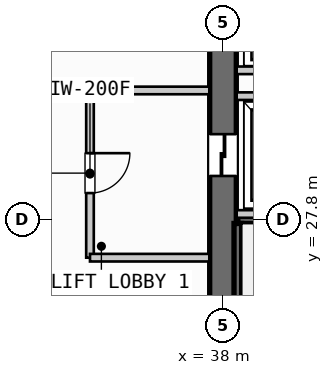
"""IFC4 building model, lengths in metres.
Left out: names, types, materials, properties, quantities, classifications, styles, units other than length and angle.
Written with IfcOpenShell. Run it as: python <this file> out.ifc"""

import sys

from ifc_helpers import new_model, si_unit, direction, frame, frame_2d, origin, place, context, subcontext, project, spatial, rectangle, extrude, source, transform, mapped, element, fill, save


model = new_model("IFC4")
c1 = context("Model", 3, precision=1e-05, world=origin(), true_north=direction((0.0, 1.0)))
c2 = subcontext(c1, "Body", "Model", "MODEL_VIEW")
j1 = project(units=[si_unit("LENGTHUNIT", "METRE"), si_unit("PLANEANGLEUNIT", "RADIAN")], contexts=[c1])
p1 = place(None, origin())
s1 = spatial("IfcSite", under=j1, at=p1, CompositionType="ELEMENT")
p2 = place(p1, origin())
s2 = spatial("IfcBuilding", under=s1, at=p2, CompositionType="ELEMENT")
p3 = place(p2, frame((0.0, 0.0, 10.0)))
s3 = spatial("IfcBuildingStorey", under=s2, at=p3, CompositionType="ELEMENT", Elevation=10.0)
p4 = place(p3, frame((38.0, 35.26, 0.0), z_axis=(0.0, 0.0, 1.0), x_axis=(0.0, -1.0, 0.0)))
e1 = element("IfcWall", 1, at=p4, inside=s3, PredefinedType="SHEAR", context=c2, shape_type="SweptSolid", body=[
    extrude(rectangle(XDim=14.92, YDim=0.7, at=frame_2d((7.46, 0.0))), origin(), (0.0, 0.0, 1.0), 4.53),
])
p5 = place(p4, frame((5.21, 0.0, 0.0)))
e2 = element("IfcOpeningElement", 2, at=p5, cuts=e1, PredefinedType="OPENING", context=c2, shape_type="SweptSolid", body=[
    extrude(rectangle(XDim=1.1, YDim=2.2, at=frame_2d((0.55, 1.1))), frame((0.0, 0.36, 0.0), z_axis=(0.0, -1.0, 0.0), x_axis=(1.0, 0.0, 0.0)), (0.0, 0.0, 1.0), 0.72),
])
p6 = place(p3, frame((38.39, 27.8, 0.0), z_axis=(0.0, 0.0, 1.0), x_axis=(1.0, 0.0, 0.0)))
e3 = element("IfcWall", 3, at=p6, inside=s3, PredefinedType="SHEAR", context=c2, shape_type="SweptSolid", body=[
    extrude(rectangle(XDim=3.06, YDim=0.2, at=frame_2d((1.53, 0.0))), origin(), (0.0, 0.0, 1.0), 4.53),
])
p7 = place(p3, frame((38.39, 20.35, 0.0), z_axis=(0.0, 0.0, 1.0), x_axis=(0.0, 1.0, 0.0)))
e4 = element("IfcWall", 4, at=p7, inside=s3, PredefinedType="SHEAR", context=c2, shape_type="SweptSolid", body=[
    extrude(rectangle(XDim=7.35, YDim=0.2, at=frame_2d((3.675, 0.0))), origin(), (0.0, 0.0, 1.0), 4.53),
])
for number, where, z_axis, x_axis in (
    (5, (38.36, 27.95, 0.0), (0.0, 0.0, 1.0), (1.0, 0.0, 0.0)),
    (6, (38.36, 31.05, 0.0), (0.0, 0.0, 1.0), (1.0, 0.0, 0.0)),
):
    element("IfcWall", number, at=place(p3, frame(where, z_axis=z_axis, x_axis=x_axis)), inside=s3, PredefinedType="PARTITIONING", context=c2, shape_type="SweptSolid", body=[
        extrude(rectangle(XDim=2.79, YDim=0.2, at=frame_2d((1.395, 0.0))), origin(), (0.0, 0.0, 1.0), 3.743),
    ])
p8 = place(p3, frame((34.5, 31.2, 0.0), z_axis=(0.0, 0.0, 1.0), x_axis=(0.0, -1.0, 0.0)))
e7 = element("IfcWall", 7, at=p8, inside=s3, PredefinedType="PARTITIONING", context=c2, shape_type="SweptSolid", body=[
    extrude(rectangle(XDim=4.4, YDim=0.2, at=frame_2d((2.2, 0.0))), origin(), (0.0, 0.0, 1.0), 3.743),
])
p9 = place(p8, frame((1.65, 0.0, 0.0)))
e8 = element("IfcOpeningElement", 8, at=p9, cuts=e7, PredefinedType="OPENING", context=c2, shape_type="SweptSolid", body=[
    extrude(rectangle(XDim=1.05, YDim=2.15, at=frame_2d((0.525, 1.075))), frame((0.0, 0.11, 0.0), z_axis=(0.0, -1.0, 0.0), x_axis=(1.0, 0.0, 0.0)), (0.0, 0.0, 1.0), 0.22),
])
for number, where, z_axis, x_axis in (
    (9, (34.5, 26.8, 0.0), (0.0, 0.0, 1.0), (1.0, 0.0, 0.0)),
    (10, (34.5, 31.2, 0.0), (0.0, 0.0, 1.0), (1.0, 0.0, 0.0)),
):
    element("IfcWall", number, at=place(p3, frame(where, z_axis=z_axis, x_axis=x_axis)), inside=s3, PredefinedType="PARTITIONING", context=c2, shape_type="SweptSolid", body=[
        extrude(rectangle(XDim=3.14, YDim=0.2, at=frame_2d((1.57, 0.0))), origin(), (0.0, 0.0, 1.0), 3.743),
    ])
p10 = place(p3, frame((38.36, 31.73, 0.0), z_axis=(0.0, 0.0, 1.0), x_axis=(1.0, 0.0, 0.0)))
e11 = element("IfcWall", 11, at=p10, inside=s3, PredefinedType="PARTITIONING", context=c2, shape_type="SweptSolid", body=[
    extrude(rectangle(XDim=7.44, YDim=0.2, at=frame_2d((3.72, 0.0))), origin(), (0.0, 0.0, 1.0), 3.743),
])
m1 = source(origin(), c2, "Body", "SweptSolid", [
    extrude(rectangle(XDim=1.1, YDim=2.2, at=frame_2d((0.55, 1.1))), frame((0.0, 0.025, 0.0), z_axis=(0.0, -1.0, 0.0), x_axis=(1.0, 0.0, 0.0)), (0.0, 0.0, 1.0), 0.05),
])
p11 = place(p5, origin())
e12 = element("IfcDoor", 12, at=p11, inside=s3, OperationType="SLIDING_TO_LEFT", PredefinedType="DOOR", context=c2, shape_type="MappedRepresentation", body=[
    mapped(m1, transform((0.0, 0.0, 0.0), scale=1.0)),
])
fill(e2, e12)
m2 = source(origin(), c2, "Body", "SweptSolid", [
    extrude(rectangle(XDim=1.05, YDim=2.15, at=frame_2d((0.525, 1.075))), frame((0.0, 0.025, 0.0), z_axis=(0.0, -1.0, 0.0), x_axis=(1.0, 0.0, 0.0)), (0.0, 0.0, 1.0), 0.05),
])
p12 = place(p9, origin())
e13 = element("IfcDoor", 13, at=p12, inside=s3, OperationType="SINGLE_SWING_LEFT", PredefinedType="DOOR", context=c2, shape_type="MappedRepresentation", body=[
    mapped(m2, transform((0.0, 0.0, 0.0), scale=1.0)),
])
fill(e8, e13)
save(model, sys.argv[1])
